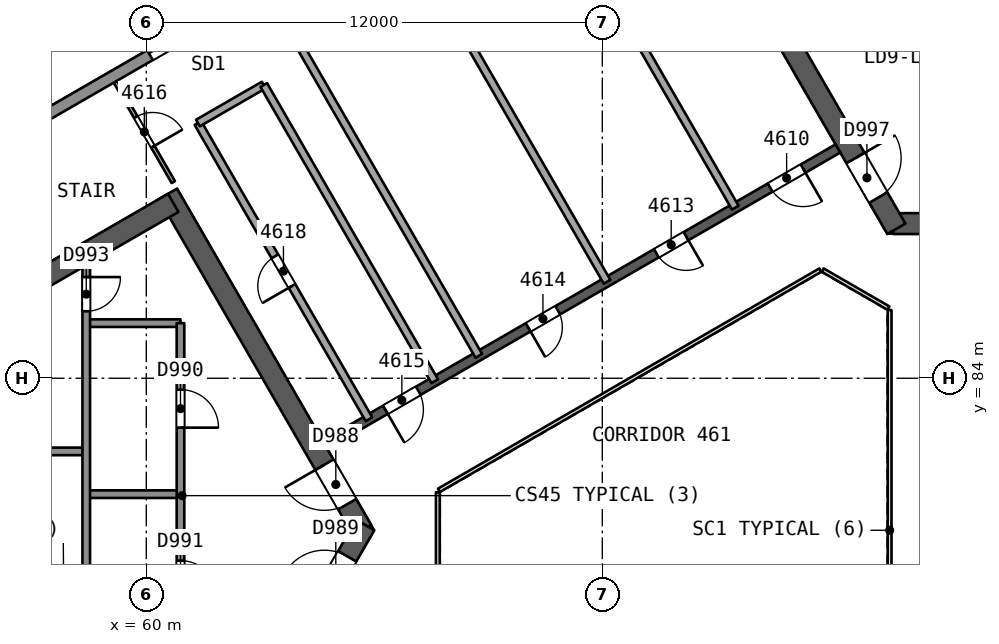
"""IFC4 building model, lengths in metres.
Left out: names, types, materials, properties, quantities, classifications, styles, units other than length and angle.
Written with IfcOpenShell. Run it as: python <this file> out.ifc"""

import sys

from ifc_helpers import new_model, si_unit, direction, frame, frame_2d, origin, place, context, subcontext, project, spatial, rectangle, extrude, element, fill, save


model = new_model("IFC4")
c1 = context("Model", 3, precision=1e-05, world=origin(), true_north=direction((0.0, 1.0)))
c2 = subcontext(c1, "Body", "Model", "MODEL_VIEW")
j1 = project(units=[si_unit("LENGTHUNIT", "METRE"), si_unit("PLANEANGLEUNIT", "RADIAN")], contexts=[c1])
p1 = place(None, origin())
s1 = spatial("IfcSite", under=j1, at=p1, CompositionType="ELEMENT")
p2 = place(p1, origin())
s2 = spatial("IfcBuilding", under=s1, at=p2, CompositionType="ELEMENT")
p3 = place(p2, frame((0.0, 0.0, 189.6)))
s3 = spatial("IfcBuildingStorey", under=s2, at=p3, CompositionType="ELEMENT", Elevation=189.6)
p4 = place(p3, frame((65.682, 80.0, 0.0), z_axis=(0.0, 0.0, 1.0), x_axis=(-0.500000202252, 0.866025287014, 0.0)))
e1 = element("IfcWall", 1, at=p4, inside=s3, PredefinedType="SHEAR", context=c2, shape_type="SweptSolid", body=[
    extrude(rectangle(XDim=10.221, YDim=0.55, at=frame_2d((5.111, 0.0))), origin(), (0.0, 0.0, 1.0), 3.7),
])
p5 = place(p4, frame((0.791, 0.0, 0.0)))
e2 = element("IfcOpeningElement", 2, at=p5, cuts=e1, PredefinedType="OPENING", context=c2, shape_type="SweptSolid", body=[
    extrude(rectangle(XDim=1.2, YDim=2.1, at=frame_2d((0.6, 1.05))), frame((0.0, 0.286, 0.0), z_axis=(0.0, -1.0, 0.0), x_axis=(1.0, 0.0, 0.0)), (0.0, 0.0, 1.0), 0.571),
])
p6 = place(p3, frame((60.709, 88.614, 0.0), z_axis=(0.0, 0.0, 1.0), x_axis=(-0.866020164116, -0.500009075263, 0.0)))
e3 = element("IfcWall", 3, at=p6, inside=s3, PredefinedType="SHEAR", context=c2, shape_type="SweptSolid", body=[
    extrude(rectangle(XDim=14.058, YDim=0.55, at=frame_2d((7.029, 0.0))), origin(), (0.0, 0.0, 1.0), 3.7),
])
p7 = place(p3, frame((60.709, 71.386, 0.0), z_axis=(0.0, 0.0, 1.0), x_axis=(0.500015938302, 0.866016201606, 0.0)))
e4 = element("IfcWall", 4, at=p7, inside=s3, PredefinedType="SHEAR", context=c2, shape_type="SweptSolid", body=[
    extrude(rectangle(XDim=10.105, YDim=0.55, at=frame_2d((5.053, 0.0))), origin(), (0.0, 0.0, 1.0), 3.7),
])
p8 = place(p7, frame((7.955, 0.0, 0.0)))
e5 = element("IfcOpeningElement", 5, at=p8, cuts=e4, PredefinedType="OPENING", context=c2, shape_type="SweptSolid", body=[
    extrude(rectangle(XDim=1.2, YDim=2.1, at=frame_2d((0.6, 1.05))), frame((0.0, 0.286, 0.0), z_axis=(0.0, -1.0, 0.0), x_axis=(1.0, 0.0, 0.0)), (0.0, 0.0, 1.0), 0.571),
])
p9 = place(p3, frame((79.659, 88.069, 0.0), z_axis=(0.0, 0.0, 1.0), x_axis=(1.0, 0.0, 0.0)))
e6 = element("IfcWall", 6, at=p9, inside=s3, PredefinedType="SHEAR", context=c2, shape_type="SweptSolid", body=[
    extrude(rectangle(XDim=10.221, YDim=0.55, at=frame_2d((5.111, 0.0))), origin(), (0.0, 0.0, 1.0), 3.7),
])
p10 = place(p9, frame((0.791, 0.0, 0.0)))
e7 = element("IfcOpeningElement", 7, at=p10, cuts=e6, PredefinedType="OPENING", context=c2, shape_type="SweptSolid", body=[
    extrude(rectangle(XDim=1.2, YDim=2.1, at=frame_2d((0.6, 1.05))), frame((0.0, 0.286, 0.0), z_axis=(0.0, -1.0, 0.0), x_axis=(1.0, 0.0, 0.0)), (0.0, 0.0, 1.0), 0.571),
])
p11 = place(p3, frame((74.686, 96.683, 0.0), z_axis=(0.0, 0.0, 1.0), x_axis=(0.499997818338, -0.866026663364, 0.0)))
e8 = element("IfcWall", 8, at=p11, inside=s3, PredefinedType="SHEAR", context=c2, shape_type="SweptSolid", body=[
    extrude(rectangle(XDim=10.105, YDim=0.55, at=frame_2d((5.052, 0.0))), origin(), (0.0, 0.0, 1.0), 3.7),
])
p12 = place(p11, frame((7.955, 0.0, 0.0)))
e9 = element("IfcOpeningElement", 9, at=p12, cuts=e8, PredefinedType="OPENING", context=c2, shape_type="SweptSolid", body=[
    extrude(rectangle(XDim=1.2, YDim=2.1, at=frame_2d((0.6, 1.05))), frame((0.0, 0.286, 0.0), z_axis=(0.0, -1.0, 0.0), x_axis=(1.0, 0.0, 0.0)), (0.0, 0.0, 1.0), 0.571),
])
p13 = place(p3, frame((78.2, 90.046, 0.0), z_axis=(0.0, 0.0, 1.0), x_axis=(-0.866026492143, -0.499998114903, 0.0)))
e10 = element("IfcWall", 10, at=p13, inside=s3, PredefinedType="SHEAR", context=c2, shape_type="SweptSolid", body=[
    extrude(rectangle(XDim=15.588, YDim=0.25, at=frame_2d((7.794, 0.0))), origin(), (0.0, 0.0, 1.0), 3.25),
])
p14 = place(p13, frame((1.059, 0.0, 0.0)))
e11 = element("IfcOpeningElement", 11, at=p14, cuts=e10, PredefinedType="OPENING", context=c2, shape_type="SweptSolid", body=[
    extrude(rectangle(XDim=1.0, YDim=2.1, at=frame_2d((0.5, 1.05))), frame((0.0, 0.135, 0.0), z_axis=(0.0, -1.0, 0.0), x_axis=(1.0, 0.0, 0.0)), (0.0, 0.0, 1.0), 0.271),
])
p15 = place(p13, frame((4.616, 0.0, 0.0)))
e12 = element("IfcOpeningElement", 12, at=p15, cuts=e10, PredefinedType="OPENING", context=c2, shape_type="SweptSolid", body=[
    extrude(rectangle(XDim=0.9, YDim=2.1, at=frame_2d((0.45, 1.05))), frame((0.0, 0.135, 0.0), z_axis=(0.0, -1.0, 0.0), x_axis=(1.0, 0.0, 0.0)), (0.0, 0.0, 1.0), 0.271),
])
p16 = place(p13, frame((8.513, 0.0, 0.0)))
e13 = element("IfcOpeningElement", 13, at=p16, cuts=e10, PredefinedType="OPENING", context=c2, shape_type="SweptSolid", body=[
    extrude(rectangle(XDim=0.9, YDim=2.1, at=frame_2d((0.45, 1.05))), frame((0.0, 0.135, 0.0), z_axis=(0.0, -1.0, 0.0), x_axis=(1.0, 0.0, 0.0)), (0.0, 0.0, 1.0), 0.271),
])
p17 = place(p13, frame((12.75, 0.0, 0.0)))
e14 = element("IfcOpeningElement", 14, at=p17, cuts=e10, PredefinedType="OPENING", context=c2, shape_type="SweptSolid", body=[
    extrude(rectangle(XDim=1.0, YDim=2.1, at=frame_2d((0.5, 1.05))), frame((0.0, 0.135, 0.0), z_axis=(0.0, -1.0, 0.0), x_axis=(1.0, 0.0, 0.0)), (0.0, 0.0, 1.0), 0.271),
])
for number, where, z_axis, x_axis in (
    (15, (69.986, 98.038, 0.0), (0.0, 0.0, 1.0), (0.5, -0.866, 0.0)),
    (16, (66.611, 96.09, 0.0), (0.0, 0.0, 1.0), (0.5, -0.866, 0.0)),
    (17, (63.236, 94.141, 0.0), (0.0, 0.0, 1.0), (0.5, -0.866, 0.0)),
):
    element("IfcWall", number, at=place(p3, frame(where, z_axis=z_axis, x_axis=x_axis)), inside=s3, PredefinedType="PARTITIONING", context=c2, shape_type="SweptSolid", body=[
        extrude(rectangle(XDim=11.029, YDim=0.2, at=frame_2d((5.514, 0.0))), origin(), (0.0, 0.0, 1.0), 3.25),
    ])
p18 = place(p3, frame((59.186, 91.803, 0.0), z_axis=(0.0, 0.0, 1.0), x_axis=(0.499978833458, -0.866037623948, 0.0)))
e18 = element("IfcWall", 18, at=p18, inside=s3, PredefinedType="PARTITIONING", context=c2, shape_type="SweptSolid", body=[
    extrude(rectangle(XDim=3.05, YDim=0.1, at=frame_2d((1.525, 0.0))), origin(), (0.0, 0.0, 1.0), 3.25),
])
p19 = place(p18, frame((1.075, 0.0, 0.0)))
e19 = element("IfcOpeningElement", 19, at=p19, cuts=e18, PredefinedType="OPENING", context=c2, shape_type="SweptSolid", body=[
    extrude(rectangle(XDim=0.9, YDim=2.1, at=frame_2d((0.45, 1.05))), frame((0.0, 0.061, 0.0), z_axis=(0.0, -1.0, 0.0), x_axis=(1.0, 0.0, 0.0)), (0.0, 0.0, 1.0), 0.121),
])
p20 = place(p3, frame((65.859, 82.921, 0.0), z_axis=(0.0, 0.0, 1.0), x_axis=(-0.5000018851, 0.866024315419, 0.0)))
e20 = element("IfcWall", 20, at=p20, inside=s3, PredefinedType="PARTITIONING", context=c2, shape_type="SweptSolid", body=[
    extrude(rectangle(XDim=9.0, YDim=0.2, at=frame_2d((4.5, 0.0))), origin(), (0.0, 0.0, 1.0), 3.25),
])
p21 = place(p20, frame((4.05, 0.0, 0.0)))
e21 = element("IfcOpeningElement", 21, at=p21, cuts=e20, PredefinedType="OPENING", context=c2, shape_type="SweptSolid", body=[
    extrude(rectangle(XDim=0.9, YDim=2.1, at=frame_2d((0.45, 1.05))), frame((0.0, 0.11, 0.0), z_axis=(0.0, -1.0, 0.0), x_axis=(1.0, 0.0, 0.0)), (0.0, 0.0, 1.0), 0.221),
])
p22 = place(p3, frame((61.359, 90.715, 0.0), z_axis=(0.0, 0.0, 1.0), x_axis=(0.866041268327, 0.499972520799, 0.0)))
e22 = element("IfcWall", 22, at=p22, inside=s3, PredefinedType="PARTITIONING", context=c2, shape_type="SweptSolid", body=[
    extrude(rectangle(XDim=2.0, YDim=0.2, at=frame_2d((1.0, 0.0))), origin(), (0.0, 0.0, 1.0), 3.25),
])
p23 = place(p3, frame((63.091, 91.715, 0.0), z_axis=(0.0, 0.0, 1.0), x_axis=(0.5000018851, -0.866024315419, 0.0)))
e23 = element("IfcWall", 23, at=p23, inside=s3, PredefinedType="PARTITIONING", context=c2, shape_type="SweptSolid", body=[
    extrude(rectangle(XDim=9.0, YDim=0.2, at=frame_2d((4.5, 0.0))), origin(), (0.0, 0.0, 1.0), 3.25),
])
p24 = place(p3, frame((43.101, 82.689, 0.0), z_axis=(0.0, 0.0, 1.0), x_axis=(0.866025007541, 0.500000686313, 0.0)))
e24 = element("IfcWall", 24, at=p24, inside=s3, PredefinedType="SOLIDWALL", context=c2, shape_type="SweptSolid", body=[
    extrude(rectangle(XDim=52.562, YDim=0.3, at=frame_2d((26.281, 0.0))), origin(), (0.0, 0.0, 1.0), 3.25),
])
p25 = place(p24, frame((31.316, 0.0, 0.0)))
e25 = element("IfcOpeningElement", 25, at=p25, cuts=e24, PredefinedType="OPENING", context=c2, shape_type="SweptSolid", body=[
    extrude(rectangle(XDim=2.4, YDim=2.4, at=frame_2d((1.2, 1.2))), frame((0.0, 0.161, 0.0), z_axis=(0.0, -1.0, 0.0), x_axis=(1.0, 0.0, 0.0)), (0.0, 0.0, 1.0), 0.321),
])
p26 = place(p24, frame((40.864, 0.0, 0.0)))
e26 = element("IfcOpeningElement", 26, at=p26, cuts=e24, PredefinedType="OPENING", context=c2, shape_type="SweptSolid", body=[
    extrude(rectangle(XDim=2.4, YDim=2.4, at=frame_2d((1.2, 1.2))), frame((0.0, 0.161, 0.0), z_axis=(0.0, -1.0, 0.0), x_axis=(1.0, 0.0, 0.0)), (0.0, 0.0, 1.0), 0.321),
])
p27 = place(p24, frame((19.625, 0.0, 0.0)))
e27 = element("IfcOpeningElement", 27, at=p27, cuts=e24, PredefinedType="OPENING", context=c2, shape_type="SweptSolid", body=[
    extrude(rectangle(XDim=2.4, YDim=2.4, at=frame_2d((1.2, 1.2))), frame((0.0, 0.161, 0.0), z_axis=(0.0, -1.0, 0.0), x_axis=(1.0, 0.0, 0.0)), (0.0, 0.0, 1.0), 0.321),
])
p28 = place(p24, frame((9.277, 0.0, 0.0)))
e28 = element("IfcOpeningElement", 28, at=p28, cuts=e24, PredefinedType="OPENING", context=c2, shape_type="SweptSolid", body=[
    extrude(rectangle(XDim=2.4, YDim=2.4, at=frame_2d((1.2, 1.2))), frame((0.0, 0.161, 0.0), z_axis=(0.0, -1.0, 0.0), x_axis=(1.0, 0.0, 0.0)), (0.0, 0.0, 1.0), 0.321),
])
p29 = place(p24, frame((28.109, 0.0, 0.9)))
e29 = element("IfcOpeningElement", 29, at=p29, cuts=e24, PredefinedType="OPENING", context=c2, shape_type="SweptSolid", body=[
    extrude(rectangle(XDim=1.8, YDim=1.5, at=frame_2d((0.9, 0.75))), frame((0.0, 0.161, 0.0), z_axis=(0.0, -1.0, 0.0), x_axis=(1.0, 0.0, 0.0)), (0.0, 0.0, 1.0), 0.321),
])
p30 = place(p24, frame((24.212, 0.0, 0.9)))
e30 = element("IfcOpeningElement", 30, at=p30, cuts=e24, PredefinedType="OPENING", context=c2, shape_type="SweptSolid", body=[
    extrude(rectangle(XDim=1.8, YDim=1.5, at=frame_2d((0.9, 0.75))), frame((0.0, 0.161, 0.0), z_axis=(0.0, -1.0, 0.0), x_axis=(1.0, 0.0, 0.0)), (0.0, 0.0, 1.0), 0.321),
])
p31 = place(p3, frame((60.9, 85.45, 0.0), z_axis=(0.0, 0.0, 1.0), x_axis=(-1.0, 0.0, 0.0)))
e31 = element("IfcWall", 31, at=p31, inside=s3, PredefinedType="SOLIDWALL", context=c2, shape_type="SweptSolid", body=[
    extrude(rectangle(XDim=2.48, YDim=0.2, at=frame_2d((1.24, 0.0))), origin(), (0.0, 0.0, 1.0), 3.25),
])
p32 = place(p3, frame((58.42, 82.075, 0.0), z_axis=(0.0, 0.0, 1.0), x_axis=(-1.0, 0.0, 0.0)))
e32 = element("IfcWall", 32, at=p32, inside=s3, PredefinedType="SOLIDWALL", context=c2, shape_type="SweptSolid", body=[
    extrude(rectangle(XDim=7.7, YDim=0.2, at=frame_2d((3.85, 0.0))), origin(), (0.0, 0.0, 1.0), 3.25),
])
p33 = place(p3, frame((60.9, 80.95, 0.0), z_axis=(0.0, 0.0, 1.0), x_axis=(-1.0, 0.0, 0.0)))
e33 = element("IfcWall", 33, at=p33, inside=s3, PredefinedType="SOLIDWALL", context=c2, shape_type="SweptSolid", body=[
    extrude(rectangle(XDim=2.48, YDim=0.2, at=frame_2d((1.24, 0.0))), origin(), (0.0, 0.0, 1.0), 3.25),
])
p34 = place(p3, frame((60.9, 85.45, 0.0), z_axis=(0.0, 0.0, 1.0), x_axis=(0.0, -1.0, 0.0)))
e34 = element("IfcWall", 34, at=p34, inside=s3, PredefinedType="SOLIDWALL", context=c2, shape_type="SweptSolid", body=[
    extrude(rectangle(XDim=10.9, YDim=0.2, at=frame_2d((5.45, 0.0))), origin(), (0.0, 0.0, 1.0), 3.25),
])
p35 = place(p34, frame((1.75, 0.0, 0.0)))
e35 = element("IfcOpeningElement", 35, at=p35, cuts=e34, PredefinedType="OPENING", context=c2, shape_type="SweptSolid", body=[
    extrude(rectangle(XDim=1.0, YDim=2.1, at=frame_2d((0.5, 1.05))), frame((0.0, 0.11, 0.0), z_axis=(0.0, -1.0, 0.0), x_axis=(1.0, 0.0, 0.0)), (0.0, 0.0, 1.0), 0.221),
])
p36 = place(p34, frame((6.25, 0.0, 0.0)))
e36 = element("IfcOpeningElement", 36, at=p36, cuts=e34, PredefinedType="OPENING", context=c2, shape_type="SweptSolid", body=[
    extrude(rectangle(XDim=1.0, YDim=2.1, at=frame_2d((0.5, 1.05))), frame((0.0, 0.11, 0.0), z_axis=(0.0, -1.0, 0.0), x_axis=(1.0, 0.0, 0.0)), (0.0, 0.0, 1.0), 0.221),
])
p37 = place(p3, frame((58.42, 86.974, 0.0), z_axis=(0.0, 0.0, 1.0), x_axis=(0.0, -1.0, 0.0)))
e37 = element("IfcWall", 37, at=p37, inside=s3, PredefinedType="SOLIDWALL", context=c2, shape_type="SweptSolid", body=[
    extrude(rectangle(XDim=10.524, YDim=0.2, at=frame_2d((5.262, 0.0))), origin(), (0.0, 0.0, 1.0), 3.25),
])
p38 = place(p37, frame((0.312, 0.0, 0.0)))
e38 = element("IfcOpeningElement", 38, at=p38, cuts=e37, PredefinedType="OPENING", context=c2, shape_type="SweptSolid", body=[
    extrude(rectangle(XDim=0.9, YDim=2.1, at=frame_2d((0.45, 1.05))), frame((0.0, 0.11, 0.0), z_axis=(0.0, -1.0, 0.0), x_axis=(1.0, 0.0, 0.0)), (0.0, 0.0, 1.0), 0.221),
])
p39 = place(p3, frame((86.77, 89.486, 0.0), z_axis=(0.0, 0.0, 1.0), x_axis=(-0.86601811187, 0.500012629753, 0.0)))
e39 = element("IfcWall", 39, at=p39, inside=s3, PredefinedType="SOLIDWALL", context=c2, shape_type="SweptSolid", body=[
    extrude(rectangle(XDim=10.9, YDim=0.2, at=frame_2d((5.45, 0.0))), origin(), (0.0, 0.0, 1.0), 3.25),
])
p40 = place(p39, frame((0.575, 0.0, 0.0)))
e40 = element("IfcOpeningElement", 40, at=p40, cuts=e39, PredefinedType="OPENING", context=c2, shape_type="SweptSolid", body=[
    extrude(rectangle(XDim=1.1, YDim=2.1, at=frame_2d((0.55, 1.05))), frame((0.0, 0.11, 0.0), z_axis=(0.0, -1.0, 0.0), x_axis=(1.0, 0.0, 0.0)), (0.0, 0.0, 1.0), 0.221),
])
p41 = place(p39, frame((2.825, 0.0, 0.0)))
e41 = element("IfcOpeningElement", 41, at=p41, cuts=e39, PredefinedType="OPENING", context=c2, shape_type="SweptSolid", body=[
    extrude(rectangle(XDim=1.1, YDim=2.1, at=frame_2d((0.55, 1.05))), frame((0.0, 0.11, 0.0), z_axis=(0.0, -1.0, 0.0), x_axis=(1.0, 0.0, 0.0)), (0.0, 0.0, 1.0), 0.221),
])
p42 = place(p39, frame((5.075, 0.0, 0.0)))
e42 = element("IfcOpeningElement", 42, at=p42, cuts=e39, PredefinedType="OPENING", context=c2, shape_type="SweptSolid", body=[
    extrude(rectangle(XDim=1.1, YDim=2.1, at=frame_2d((0.55, 1.05))), frame((0.0, 0.11, 0.0), z_axis=(0.0, -1.0, 0.0), x_axis=(1.0, 0.0, 0.0)), (0.0, 0.0, 1.0), 0.221),
])
p43 = place(p39, frame((7.325, 0.0, 0.0)))
e43 = element("IfcOpeningElement", 43, at=p43, cuts=e39, PredefinedType="OPENING", context=c2, shape_type="SweptSolid", body=[
    extrude(rectangle(XDim=1.1, YDim=2.1, at=frame_2d((0.55, 1.05))), frame((0.0, 0.11, 0.0), z_axis=(0.0, -1.0, 0.0), x_axis=(1.0, 0.0, 0.0)), (0.0, 0.0, 1.0), 0.221),
])
p44 = place(p3, frame((89.33, 90.872, 0.0), z_axis=(0.0, 0.0, 1.0), x_axis=(-0.866027589512, 0.49999621419, 0.0)))
e44 = element("IfcWall", 44, at=p44, inside=s3, PredefinedType="SOLIDWALL", context=c2, shape_type="SweptSolid", body=[
    extrude(rectangle(XDim=10.524, YDim=0.2, at=frame_2d((5.262, 0.0))), origin(), (0.0, 0.0, 1.0), 3.25),
])
p45 = place(p44, frame((0.312, 0.0, 0.0)))
e45 = element("IfcOpeningElement", 45, at=p45, cuts=e44, PredefinedType="OPENING", context=c2, shape_type="SweptSolid", body=[
    extrude(rectangle(XDim=0.9, YDim=2.1, at=frame_2d((0.45, 1.05))), frame((0.0, 0.11, 0.0), z_axis=(0.0, -1.0, 0.0), x_axis=(1.0, 0.0, 0.0)), (0.0, 0.0, 1.0), 0.221),
])
p46 = place(p3, frame((79.56, 74.206, 0.0), z_axis=(0.0, 0.0, 1.0), x_axis=(0.0, 1.0, 0.0)))
e46 = element("IfcWall", 46, at=p46, inside=s3, PredefinedType="PARTITIONING", context=c2, shape_type="SweptSolid", body=[
    extrude(rectangle(XDim=11.588, YDim=0.1, at=frame_2d((5.794, 0.0))), origin(), (0.0, 0.0, 1.0), 3.25),
])
p47 = place(p3, frame((79.53, 85.846, 0.0), z_axis=(0.0, 0.0, 1.0), x_axis=(-0.866041268327, 0.499972520799, 0.0)))
e47 = element("IfcWall", 47, at=p47, inside=s3, PredefinedType="PARTITIONING", context=c2, shape_type="SweptSolid", body=[
    extrude(rectangle(XDim=2.0, YDim=0.1, at=frame_2d((1.0, 0.0))), origin(), (0.0, 0.0, 1.0), 3.25),
])
p48 = place(p3, frame((77.738, 86.846, 0.0), z_axis=(0.0, 0.0, 1.0), x_axis=(-0.866026658274, -0.499997827154, 0.0)))
e48 = element("IfcWall", 48, at=p48, inside=s3, PredefinedType="PARTITIONING", context=c2, shape_type="SweptSolid", body=[
    extrude(rectangle(XDim=11.588, YDim=0.1, at=frame_2d((5.794, 0.0))), origin(), (0.0, 0.0, 1.0), 3.25),
])
p49 = place(p3, frame((67.672, 81.0, 0.0), z_axis=(0.0, 0.0, 1.0), x_axis=(0.0, -1.0, 0.0)))
e49 = element("IfcWall", 49, at=p49, inside=s3, PredefinedType="PARTITIONING", context=c2, shape_type="SweptSolid", body=[
    extrude(rectangle(XDim=2.0, YDim=0.1, at=frame_2d((1.0, 0.0))), origin(), (0.0, 0.0, 1.0), 3.25),
])
p50 = place(p14, origin())
e50 = element("IfcDoor", 50, at=p50, inside=s3, OperationType="SINGLE_SWING_LEFT", PredefinedType="NOTDEFINED", context=c2, shape_type="SweptSolid", body=[
    extrude(rectangle(XDim=1.0, YDim=2.1, at=frame_2d((0.5, 1.05))), frame((0.0, 0.025, 0.0), z_axis=(0.0, -1.0, 0.0), x_axis=(1.0, 0.0, 0.0)), (0.0, 0.0, 1.0), 0.05),
])
fill(e11, e50)
p51 = place(p15, origin())
e51 = element("IfcDoor", 51, at=p51, inside=s3, OperationType="SINGLE_SWING_LEFT", PredefinedType="NOTDEFINED", context=c2, shape_type="SweptSolid", body=[
    extrude(rectangle(XDim=0.9, YDim=2.1, at=frame_2d((0.45, 1.05))), frame((0.0, 0.025, 0.0), z_axis=(0.0, -1.0, 0.0), x_axis=(1.0, 0.0, 0.0)), (0.0, 0.0, 1.0), 0.05),
])
fill(e12, e51)
p52 = place(p16, origin())
e52 = element("IfcDoor", 52, at=p52, inside=s3, OperationType="SINGLE_SWING_RIGHT", PredefinedType="NOTDEFINED", context=c2, shape_type="SweptSolid", body=[
    extrude(rectangle(XDim=0.9, YDim=2.1, at=frame_2d((0.45, 1.05))), frame((0.0, 0.025, 0.0), z_axis=(0.0, -1.0, 0.0), x_axis=(1.0, 0.0, 0.0)), (0.0, 0.0, 1.0), 0.05),
])
fill(e13, e52)
p53 = place(p17, origin())
e53 = element("IfcDoor", 53, at=p53, inside=s3, OperationType="SINGLE_SWING_RIGHT", PredefinedType="NOTDEFINED", context=c2, shape_type="SweptSolid", body=[
    extrude(rectangle(XDim=1.0, YDim=2.1, at=frame_2d((0.5, 1.05))), frame((0.0, 0.025, 0.0), z_axis=(0.0, -1.0, 0.0), x_axis=(1.0, 0.0, 0.0)), (0.0, 0.0, 1.0), 0.05),
])
fill(e14, e53)
p54 = place(p19, origin())
e54 = element("IfcDoor", 54, at=p54, inside=s3, OperationType="SINGLE_SWING_RIGHT", PredefinedType="NOTDEFINED", context=c2, shape_type="SweptSolid", body=[
    extrude(rectangle(XDim=0.9, YDim=2.1, at=frame_2d((0.45, 1.05))), frame((0.0, 0.025, 0.0), z_axis=(0.0, -1.0, 0.0), x_axis=(1.0, 0.0, 0.0)), (0.0, 0.0, 1.0), 0.05),
])
fill(e19, e54)
p55 = place(p21, origin())
e55 = element("IfcDoor", 55, at=p55, inside=s3, OperationType="SINGLE_SWING_LEFT", PredefinedType="NOTDEFINED", context=c2, shape_type="SweptSolid", body=[
    extrude(rectangle(XDim=0.9, YDim=2.1, at=frame_2d((0.45, 1.05))), frame((0.0, 0.025, 0.0), z_axis=(0.0, -1.0, 0.0), x_axis=(1.0, 0.0, 0.0)), (0.0, 0.0, 1.0), 0.05),
])
fill(e21, e55)
p56 = place(p27, origin())
e56 = element("IfcDoor", 56, at=p56, inside=s3, OperationType="SLIDING_TO_LEFT", PredefinedType="NOTDEFINED", context=c2, shape_type="SweptSolid", body=[
    extrude(rectangle(XDim=2.4, YDim=2.4, at=frame_2d((1.2, 1.2))), frame((0.0, 0.025, 0.0), z_axis=(0.0, -1.0, 0.0), x_axis=(1.0, 0.0, 0.0)), (0.0, 0.0, 1.0), 0.05),
])
fill(e27, e56)
p57 = place(p5, origin())
e57 = element("IfcDoor", 57, at=p57, inside=s3, OperationType="SINGLE_SWING_RIGHT", PredefinedType="NOTDEFINED", context=c2, shape_type="SweptSolid", body=[
    extrude(rectangle(XDim=1.2, YDim=2.1, at=frame_2d((0.6, 1.05))), frame((0.0, 0.025, 0.0), z_axis=(0.0, -1.0, 0.0), x_axis=(1.0, 0.0, 0.0)), (0.0, 0.0, 1.0), 0.05),
])
fill(e2, e57)
p58 = place(p8, origin())
e58 = element("IfcDoor", 58, at=p58, inside=s3, OperationType="SINGLE_SWING_LEFT", PredefinedType="NOTDEFINED", context=c2, shape_type="SweptSolid", body=[
    extrude(rectangle(XDim=1.2, YDim=2.1, at=frame_2d((0.6, 1.05))), frame((0.0, 0.025, 0.0), z_axis=(0.0, -1.0, 0.0), x_axis=(1.0, 0.0, 0.0)), (0.0, 0.0, 1.0), 0.05),
])
fill(e5, e58)
p59 = place(p35, origin())
e59 = element("IfcDoor", 59, at=p59, inside=s3, OperationType="SINGLE_SWING_RIGHT", PredefinedType="NOTDEFINED", context=c2, shape_type="SweptSolid", body=[
    extrude(rectangle(XDim=1.0, YDim=2.1, at=frame_2d((0.5, 1.05))), frame((0.0, 0.025, 0.0), z_axis=(0.0, -1.0, 0.0), x_axis=(1.0, 0.0, 0.0)), (0.0, 0.0, 1.0), 0.05),
])
fill(e35, e59)
p60 = place(p36, origin())
e60 = element("IfcDoor", 60, at=p60, inside=s3, OperationType="SINGLE_SWING_RIGHT", PredefinedType="NOTDEFINED", context=c2, shape_type="SweptSolid", body=[
    extrude(rectangle(XDim=1.0, YDim=2.1, at=frame_2d((0.5, 1.05))), frame((0.0, 0.025, 0.0), z_axis=(0.0, -1.0, 0.0), x_axis=(1.0, 0.0, 0.0)), (0.0, 0.0, 1.0), 0.05),
])
fill(e36, e60)
p61 = place(p38, origin())
e61 = element("IfcDoor", 61, at=p61, inside=s3, OperationType="SINGLE_SWING_LEFT", PredefinedType="NOTDEFINED", context=c2, shape_type="SweptSolid", body=[
    extrude(rectangle(XDim=0.9, YDim=2.1, at=frame_2d((0.45, 1.05))), frame((0.0, 0.025, 0.0), z_axis=(0.0, -1.0, 0.0), x_axis=(1.0, 0.0, 0.0)), (0.0, 0.0, 1.0), 0.05),
])
fill(e38, e61)
p62 = place(p12, origin())
e62 = element("IfcDoor", 62, at=p62, inside=s3, OperationType="SINGLE_SWING_LEFT", PredefinedType="NOTDEFINED", context=c2, shape_type="SweptSolid", body=[
    extrude(rectangle(XDim=1.2, YDim=2.1, at=frame_2d((0.6, 1.05))), frame((0.0, 0.025, 0.0), z_axis=(0.0, -1.0, 0.0), x_axis=(1.0, 0.0, 0.0)), (0.0, 0.0, 1.0), 0.05),
])
fill(e9, e62)
save(model, sys.argv[1])
